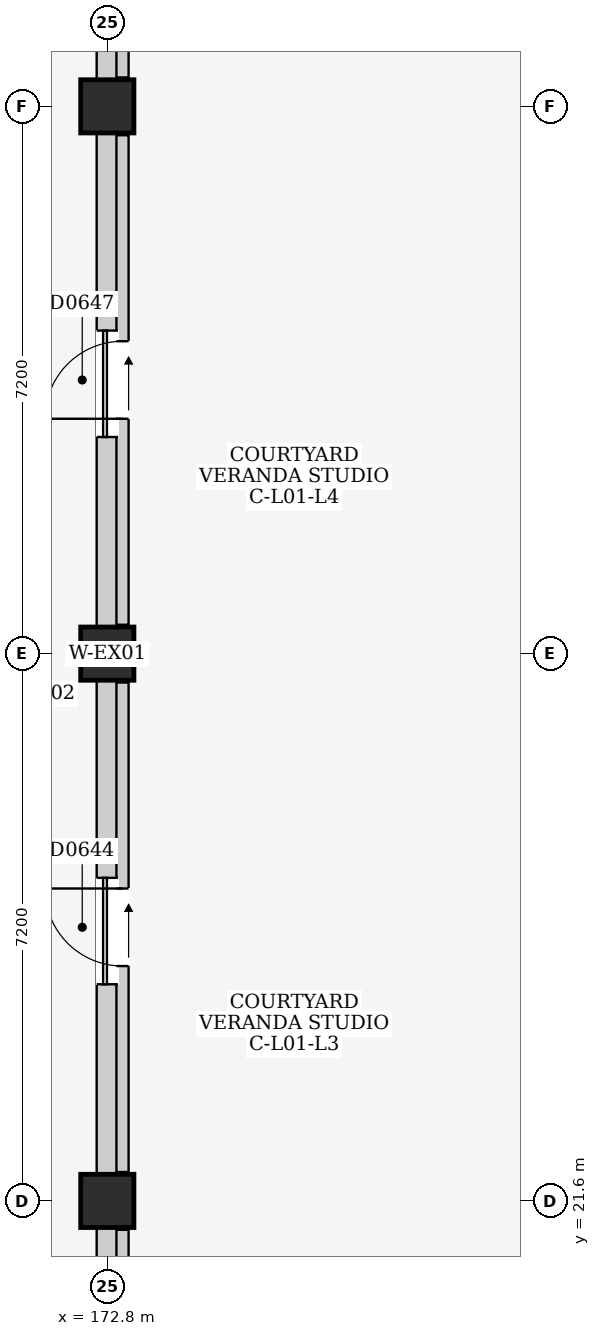
"""IFC4 building model, lengths in metres.
Left out: names, types, materials, properties, quantities, classifications, styles, units other than length and angle.
Written with IfcOpenShell. Run it as: python <this file> out.ifc"""

import sys

from ifc_helpers import new_model, si_unit, direction, frame, frame_2d, origin, origin_2d, place, context, subcontext, project, spatial, rectangle, extrude, element, fill, save


model = new_model("IFC4")
c1 = context("Model", 3, precision=1e-05, world=origin(), true_north=direction((0.0, 1.0)))
c2 = subcontext(c1, "Body", "Model", "MODEL_VIEW")
j1 = project(units=[si_unit("LENGTHUNIT", "METRE"), si_unit("PLANEANGLEUNIT", "RADIAN")], contexts=[c1])
p1 = place(None, origin())
s1 = spatial("IfcSite", under=j1, at=p1, CompositionType="ELEMENT")
p2 = place(p1, origin())
s2 = spatial("IfcBuilding", under=s1, at=p2, CompositionType="ELEMENT")
p3 = place(p2, frame((0.0, 0.0, 4.5)))
s3 = spatial("IfcBuildingStorey", under=s2, at=p3, CompositionType="ELEMENT", Elevation=4.5)
for number, where, z_axis, x_axis in (
    (1, (172.8, 21.6, 0.0), (0.0, 0.0, 1.0), (1.0, 0.0, 0.0)),
    (2, (172.8, 28.8, 0.0), (0.0, 0.0, 1.0), (1.0, 0.0, 0.0)),
    (3, (172.8, 36.0, 0.0), (0.0, 0.0, 1.0), (1.0, 0.0, 0.0)),
):
    element("IfcColumn", number, at=place(p3, frame(where, z_axis=z_axis, x_axis=x_axis)), inside=s3, PredefinedType="COLUMN", context=c2, shape_type="SweptSolid", body=[
        extrude(rectangle(XDim=0.7, YDim=0.7, at=origin_2d()), origin(), (0.0, 0.0, 1.0), 4.5),
    ])
p4 = place(p3, frame((172.8, 14.75, 0.0), z_axis=(0.0, 0.0, 1.0), x_axis=(0.0, 1.0, 0.0)))
e4 = element("IfcWall", 4, at=p4, inside=s3, PredefinedType="ELEMENTEDWALL", context=c2, shape_type="SweptSolid", body=[
    extrude(rectangle(XDim=6.5, YDim=0.28, at=frame_2d((3.25, 0.0))), origin(), (0.0, 0.0, 1.0), 3.685),
])
p5 = place(p4, frame((2.5, 0.0, 0.0)))
e5 = element("IfcOpeningElement", 5, at=p5, cuts=e4, PredefinedType="OPENING", context=c2, shape_type="SweptSolid", body=[
    extrude(rectangle(XDim=1.4, YDim=2.1, at=frame_2d((0.7, 1.05))), frame((0.0, 0.155, 0.0), z_axis=(0.0, -1.0, 0.0), x_axis=(1.0, 0.0, 0.0)), (0.0, 0.0, 1.0), 0.31),
])
p6 = place(p3, frame((172.8, 21.95, 0.0), z_axis=(0.0, 0.0, 1.0), x_axis=(0.0, 1.0, 0.0)))
e6 = element("IfcWall", 6, at=p6, inside=s3, PredefinedType="ELEMENTEDWALL", context=c2, shape_type="SweptSolid", body=[
    extrude(rectangle(XDim=6.5, YDim=0.28, at=frame_2d((3.25, 0.0))), origin(), (0.0, 0.0, 1.0), 3.685),
])
p7 = place(p6, frame((2.5, 0.0, 0.0)))
e7 = element("IfcOpeningElement", 7, at=p7, cuts=e6, PredefinedType="OPENING", context=c2, shape_type="SweptSolid", body=[
    extrude(rectangle(XDim=1.4, YDim=2.1, at=frame_2d((0.7, 1.05))), frame((0.0, 0.155, 0.0), z_axis=(0.0, -1.0, 0.0), x_axis=(1.0, 0.0, 0.0)), (0.0, 0.0, 1.0), 0.31),
])
p8 = place(p3, frame((172.8, 29.15, 0.0), z_axis=(0.0, 0.0, 1.0), x_axis=(0.0, 1.0, 0.0)))
e8 = element("IfcWall", 8, at=p8, inside=s3, PredefinedType="ELEMENTEDWALL", context=c2, shape_type="SweptSolid", body=[
    extrude(rectangle(XDim=6.5, YDim=0.28, at=frame_2d((3.25, 0.0))), origin(), (0.0, 0.0, 1.0), 3.685),
])
p9 = place(p8, frame((2.5, 0.0, 0.0)))
e9 = element("IfcOpeningElement", 9, at=p9, cuts=e8, PredefinedType="OPENING", context=c2, shape_type="SweptSolid", body=[
    extrude(rectangle(XDim=1.4, YDim=2.1, at=frame_2d((0.7, 1.05))), frame((0.0, 0.155, 0.0), z_axis=(0.0, -1.0, 0.0), x_axis=(1.0, 0.0, 0.0)), (0.0, 0.0, 1.0), 0.31),
])
p10 = place(p3, frame((172.8, 36.35, 0.0), z_axis=(0.0, 0.0, 1.0), x_axis=(0.0, 1.0, 0.0)))
e10 = element("IfcWall", 10, at=p10, inside=s3, PredefinedType="ELEMENTEDWALL", context=c2, shape_type="SweptSolid", body=[
    extrude(rectangle(XDim=6.5, YDim=0.28, at=frame_2d((3.25, 0.0))), origin(), (0.0, 0.0, 1.0), 3.685),
])
p11 = place(p10, frame((2.5, 0.0, 0.0)))
e11 = element("IfcOpeningElement", 11, at=p11, cuts=e10, PredefinedType="OPENING", context=c2, shape_type="SweptSolid", body=[
    extrude(rectangle(XDim=1.4, YDim=2.1, at=frame_2d((0.7, 1.05))), frame((0.0, 0.155, 0.0), z_axis=(0.0, -1.0, 0.0), x_axis=(1.0, 0.0, 0.0)), (0.0, 0.0, 1.0), 0.31),
])
p12 = place(p3, frame((173.0, 14.78, 0.0), z_axis=(0.0, 0.0, 1.0), x_axis=(0.0, 1.0, 0.0)))
e12 = element("IfcWall", 12, at=p12, inside=s3, PredefinedType="PARTITIONING", context=c2, shape_type="SweptSolid", body=[
    extrude(rectangle(XDim=6.44, YDim=0.16, at=frame_2d((3.22, 0.0))), origin(), (0.0, 0.0, 1.0), 3.685),
])
p13 = place(p12, frame((2.71, 0.0, 0.0)))
e13 = element("IfcOpeningElement", 13, at=p13, cuts=e12, PredefinedType="OPENING", context=c2, shape_type="SweptSolid", body=[
    extrude(rectangle(XDim=1.02, YDim=2.18, at=frame_2d((0.51, 1.09))), frame((0.0, 0.095, 0.0), z_axis=(0.0, -1.0, 0.0), x_axis=(1.0, 0.0, 0.0)), (0.0, 0.0, 1.0), 0.19),
])
p14 = place(p3, frame((173.0, 21.98, 0.0), z_axis=(0.0, 0.0, 1.0), x_axis=(0.0, 1.0, 0.0)))
e14 = element("IfcWall", 14, at=p14, inside=s3, PredefinedType="PARTITIONING", context=c2, shape_type="SweptSolid", body=[
    extrude(rectangle(XDim=6.44, YDim=0.16, at=frame_2d((3.22, 0.0))), origin(), (0.0, 0.0, 1.0), 3.685),
])
p15 = place(p14, frame((2.71, 0.0, 0.0)))
e15 = element("IfcOpeningElement", 15, at=p15, cuts=e14, PredefinedType="OPENING", context=c2, shape_type="SweptSolid", body=[
    extrude(rectangle(XDim=1.02, YDim=2.18, at=frame_2d((0.51, 1.09))), frame((0.0, 0.095, 0.0), z_axis=(0.0, -1.0, 0.0), x_axis=(1.0, 0.0, 0.0)), (0.0, 0.0, 1.0), 0.19),
])
p16 = place(p3, frame((173.0, 29.18, 0.0), z_axis=(0.0, 0.0, 1.0), x_axis=(0.0, 1.0, 0.0)))
e16 = element("IfcWall", 16, at=p16, inside=s3, PredefinedType="PARTITIONING", context=c2, shape_type="SweptSolid", body=[
    extrude(rectangle(XDim=6.44, YDim=0.16, at=frame_2d((3.22, 0.0))), origin(), (0.0, 0.0, 1.0), 3.685),
])
p17 = place(p16, frame((2.71, 0.0, 0.0)))
e17 = element("IfcOpeningElement", 17, at=p17, cuts=e16, PredefinedType="OPENING", context=c2, shape_type="SweptSolid", body=[
    extrude(rectangle(XDim=1.02, YDim=2.18, at=frame_2d((0.51, 1.09))), frame((0.0, 0.095, 0.0), z_axis=(0.0, -1.0, 0.0), x_axis=(1.0, 0.0, 0.0)), (0.0, 0.0, 1.0), 0.19),
])
p18 = place(p3, frame((173.0, 36.38, 0.0), z_axis=(0.0, 0.0, 1.0), x_axis=(0.0, 1.0, 0.0)))
e18 = element("IfcWall", 18, at=p18, inside=s3, PredefinedType="PARTITIONING", context=c2, shape_type="SweptSolid", body=[
    extrude(rectangle(XDim=6.44, YDim=0.16, at=frame_2d((3.22, 0.0))), origin(), (0.0, 0.0, 1.0), 3.685),
])
p19 = place(p18, frame((2.71, 0.0, 0.0)))
e19 = element("IfcOpeningElement", 19, at=p19, cuts=e18, PredefinedType="OPENING", context=c2, shape_type="SweptSolid", body=[
    extrude(rectangle(XDim=1.02, YDim=2.18, at=frame_2d((0.51, 1.09))), frame((0.0, 0.095, 0.0), z_axis=(0.0, -1.0, 0.0), x_axis=(1.0, 0.0, 0.0)), (0.0, 0.0, 1.0), 0.19),
])
p20 = place(p7, frame((1.4, 0.0, 0.0), z_axis=(0.0, 0.0, 1.0), x_axis=(-1.0, 0.0, 0.0)))
e20 = element("IfcDoor", 20, at=p20, inside=s3, OperationType="SLIDING_TO_RIGHT", PredefinedType="DOOR", context=c2, shape_type="SweptSolid", body=[
    extrude(rectangle(XDim=1.4, YDim=2.1, at=frame_2d((0.7, 1.05))), frame((0.0, 0.025, 0.0), z_axis=(0.0, -1.0, 0.0), x_axis=(1.0, 0.0, 0.0)), (0.0, 0.0, 1.0), 0.05),
])
fill(e7, e20)
p21 = place(p9, frame((1.4, 0.0, 0.0), z_axis=(0.0, 0.0, 1.0), x_axis=(-1.0, 0.0, 0.0)))
e21 = element("IfcDoor", 21, at=p21, inside=s3, OperationType="SLIDING_TO_RIGHT", PredefinedType="DOOR", context=c2, shape_type="SweptSolid", body=[
    extrude(rectangle(XDim=1.4, YDim=2.1, at=frame_2d((0.7, 1.05))), frame((0.0, 0.025, 0.0), z_axis=(0.0, -1.0, 0.0), x_axis=(1.0, 0.0, 0.0)), (0.0, 0.0, 1.0), 0.05),
])
fill(e9, e21)
p22 = place(p15, origin())
e22 = element("IfcDoor", 22, at=p22, inside=s3, OperationType="SINGLE_SWING_RIGHT", PredefinedType="DOOR", context=c2, shape_type="SweptSolid", body=[
    extrude(rectangle(XDim=1.02, YDim=2.18, at=frame_2d((0.51, 1.09))), frame((0.0, 0.025, 0.0), z_axis=(0.0, -1.0, 0.0), x_axis=(1.0, 0.0, 0.0)), (0.0, 0.0, 1.0), 0.05),
])
fill(e15, e22)
p23 = place(p17, origin())
e23 = element("IfcDoor", 23, at=p23, inside=s3, OperationType="SINGLE_SWING_LEFT", PredefinedType="DOOR", context=c2, shape_type="SweptSolid", body=[
    extrude(rectangle(XDim=1.02, YDim=2.18, at=frame_2d((0.51, 1.09))), frame((0.0, 0.025, 0.0), z_axis=(0.0, -1.0, 0.0), x_axis=(1.0, 0.0, 0.0)), (0.0, 0.0, 1.0), 0.05),
])
fill(e17, e23)
save(model, sys.argv[1])
